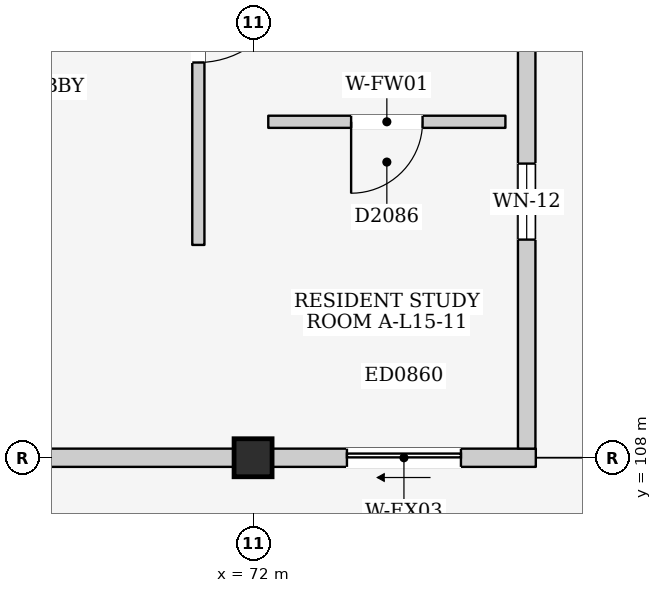
"""IFC4 building model, lengths in metres.
Left out: names, types, materials, properties, quantities, classifications, styles, units other than length and angle.
Written with IfcOpenShell. Run it as: python <this file> out.ifc"""

import sys

from ifc_helpers import new_model, si_unit, direction, frame, frame_2d, origin, origin_2d, place, context, subcontext, project, spatial, rectangle, extrude, element, fill, save


model = new_model("IFC4")
c1 = context("Model", 3, precision=1e-05, world=origin(), true_north=direction((0.0, 1.0)))
c2 = subcontext(c1, "Body", "Model", "MODEL_VIEW")
j1 = project(units=[si_unit("LENGTHUNIT", "METRE"), si_unit("PLANEANGLEUNIT", "RADIAN")], contexts=[c1])
p1 = place(None, origin())
s1 = spatial("IfcSite", under=j1, at=p1, CompositionType="ELEMENT")
p2 = place(p1, origin())
s2 = spatial("IfcBuilding", under=s1, at=p2, CompositionType="ELEMENT")
p3 = place(p2, frame((0.0, 0.0, 50.9)))
s3 = spatial("IfcBuildingStorey", under=s2, at=p3, CompositionType="ELEMENT", Elevation=50.9)
p4 = place(p3, frame((72.0, 108.0, 0.0), z_axis=(0.0, 0.0, 1.0), x_axis=(1.0, 0.0, 0.0)))
e1 = element("IfcColumn", 1, at=p4, inside=s3, PredefinedType="COLUMN", context=c2, shape_type="SweptSolid", body=[
    extrude(rectangle(XDim=0.5, YDim=0.5, at=origin_2d()), origin(), (0.0, 0.0, 1.0), 3.2),
])
p5 = place(p3, frame((65.05, 108.0, 0.0), z_axis=(0.0, 0.0, 1.0), x_axis=(1.0, 0.0, 0.0)))
e2 = element("IfcWall", 2, at=p5, inside=s3, PredefinedType="ELEMENTEDWALL", context=c2, shape_type="SweptSolid", body=[
    extrude(rectangle(XDim=6.7, YDim=0.24, at=frame_2d((3.35, 0.0))), origin(), (0.0, 0.0, 1.0), 2.295),
])
p6 = place(p5, frame((2.85, 0.0, 1.2)))
e3 = element("IfcOpeningElement", 3, at=p6, cuts=e2, PredefinedType="OPENING", context=c2, shape_type="SweptSolid", body=[
    extrude(rectangle(XDim=1.0, YDim=0.9, at=frame_2d((0.5, 0.45))), frame((0.0, 0.135, 0.0), z_axis=(0.0, -1.0, 0.0), x_axis=(1.0, 0.0, 0.0)), (0.0, 0.0, 1.0), 0.27),
])
p7 = place(p3, frame((72.25, 108.0, 0.0), z_axis=(0.0, 0.0, 1.0), x_axis=(1.0, 0.0, 0.0)))
e4 = element("IfcWall", 4, at=p7, inside=s3, PredefinedType="ELEMENTEDWALL", context=c2, shape_type="SweptSolid", body=[
    extrude(rectangle(XDim=3.47, YDim=0.24, at=frame_2d((1.735, 0.0))), origin(), (0.0, 0.0, 1.0), 2.295),
])
p8 = place(p7, frame((0.985, 0.0, 0.0)))
e5 = element("IfcOpeningElement", 5, at=p8, cuts=e4, PredefinedType="OPENING", context=c2, shape_type="SweptSolid", body=[
    extrude(rectangle(XDim=1.5, YDim=2.12, at=frame_2d((0.75, 1.06))), frame((0.0, 0.135, 0.0), z_axis=(0.0, -1.0, 0.0), x_axis=(1.0, 0.0, 0.0)), (0.0, 0.0, 1.0), 0.27),
])
p9 = place(p3, frame((75.6, 108.12, 0.0), z_axis=(0.0, 0.0, 1.0), x_axis=(0.0, 1.0, 0.0)))
e6 = element("IfcWall", 6, at=p9, inside=s3, PredefinedType="ELEMENTEDWALL", context=c2, shape_type="SweptSolid", body=[
    extrude(rectangle(XDim=7.08, YDim=0.23, at=frame_2d((3.54, 0.0))), origin(), (0.0, 0.0, 1.0), 2.395),
])
p10 = place(p9, frame((2.75, 0.0, 1.1)))
e7 = element("IfcOpeningElement", 7, at=p10, cuts=e6, PredefinedType="OPENING", context=c2, shape_type="SweptSolid", body=[
    extrude(rectangle(XDim=1.0, YDim=0.9, at=frame_2d((0.5, 0.45))), frame((0.0, 0.13, 0.0), z_axis=(0.0, -1.0, 0.0), x_axis=(1.0, 0.0, 0.0)), (0.0, 0.0, 1.0), 0.26),
])
p11 = place(p3, frame((71.28, 110.8, 0.0), z_axis=(0.0, 0.0, 1.0), x_axis=(0.0, 1.0, 0.0)))
e8 = element("IfcWall", 8, at=p11, inside=s3, PredefinedType="PARTITIONING", context=c2, shape_type="SweptSolid", body=[
    extrude(rectangle(XDim=4.32, YDim=0.16, at=frame_2d((2.16, 0.0))), origin(), (0.0, 0.0, 1.0), 2.96),
])
p12 = place(p11, frame((2.4, 0.0, 0.0)))
e9 = element("IfcOpeningElement", 9, at=p12, cuts=e8, PredefinedType="OPENING", context=c2, shape_type="SweptSolid", body=[
    extrude(rectangle(XDim=1.2, YDim=2.2, at=frame_2d((0.6, 1.1))), frame((0.0, 0.095, 0.0), z_axis=(0.0, -1.0, 0.0), x_axis=(1.0, 0.0, 0.0)), (0.0, 0.0, 1.0), 0.19),
])
p13 = place(p3, frame((72.2, 112.42, 0.0), z_axis=(0.0, 0.0, 1.0), x_axis=(1.0, 0.0, 0.0)))
e10 = element("IfcWall", 10, at=p13, inside=s3, PredefinedType="PARTITIONING", context=c2, shape_type="SweptSolid", body=[
    extrude(rectangle(XDim=3.12, YDim=0.16, at=frame_2d((1.56, 0.0))), origin(), (0.0, 0.0, 1.0), 2.96),
])
p14 = place(p13, frame((1.09, 0.0, 0.0)))
e11 = element("IfcOpeningElement", 11, at=p14, cuts=e10, PredefinedType="OPENING", context=c2, shape_type="SweptSolid", body=[
    extrude(rectangle(XDim=0.94, YDim=2.12, at=frame_2d((0.47, 1.06))), frame((0.0, 0.095, 0.0), z_axis=(0.0, -1.0, 0.0), x_axis=(1.0, 0.0, 0.0)), (0.0, 0.0, 1.0), 0.19),
])
p15 = place(p8, frame((1.5, 0.0, 0.0), z_axis=(0.0, 0.0, 1.0), x_axis=(-1.0, 0.0, 0.0)))
e12 = element("IfcDoor", 12, at=p15, inside=s3, OperationType="SLIDING_TO_LEFT", PredefinedType="DOOR", context=c2, shape_type="SweptSolid", body=[
    extrude(rectangle(XDim=1.5, YDim=2.12, at=frame_2d((0.75, 1.06))), frame((0.0, 0.025, 0.0), z_axis=(0.0, -1.0, 0.0), x_axis=(1.0, 0.0, 0.0)), (0.0, 0.0, 1.0), 0.05),
])
fill(e5, e12)
p16 = place(p10, origin())
e13 = element("IfcWindow", 13, at=p16, inside=s3, PartitioningType="SINGLE_PANEL", PredefinedType="WINDOW", context=c2, shape_type="SweptSolid", body=[
    extrude(rectangle(XDim=1.0, YDim=0.9, at=frame_2d((0.5, 0.45))), frame((0.0, 0.03, 0.0), z_axis=(0.0, -1.0, 0.0), x_axis=(1.0, 0.0, 0.0)), (0.0, 0.0, 1.0), 0.06),
])
fill(e7, e13)
p17 = place(p12, frame((1.2, 0.0, 0.0), z_axis=(0.0, 0.0, 1.0), x_axis=(-1.0, 0.0, 0.0)))
e14 = element("IfcDoor", 14, at=p17, inside=s3, OperationType="SINGLE_SWING_LEFT", PredefinedType="DOOR", context=c2, shape_type="SweptSolid", body=[
    extrude(rectangle(XDim=1.2, YDim=2.2, at=frame_2d((0.6, 1.1))), frame((0.0, 0.025, 0.0), z_axis=(0.0, -1.0, 0.0), x_axis=(1.0, 0.0, 0.0)), (0.0, 0.0, 1.0), 0.05),
])
fill(e9, e14)
p18 = place(p14, frame((0.94, 0.0, 0.0), z_axis=(0.0, 0.0, 1.0), x_axis=(-1.0, 0.0, 0.0)))
e15 = element("IfcDoor", 15, at=p18, inside=s3, OperationType="SINGLE_SWING_RIGHT", PredefinedType="DOOR", context=c2, shape_type="SweptSolid", body=[
    extrude(rectangle(XDim=0.94, YDim=2.12, at=frame_2d((0.47, 1.06))), frame((0.0, 0.025, 0.0), z_axis=(0.0, -1.0, 0.0), x_axis=(1.0, 0.0, 0.0)), (0.0, 0.0, 1.0), 0.05),
])
fill(e11, e15)
save(model, sys.argv[1])
